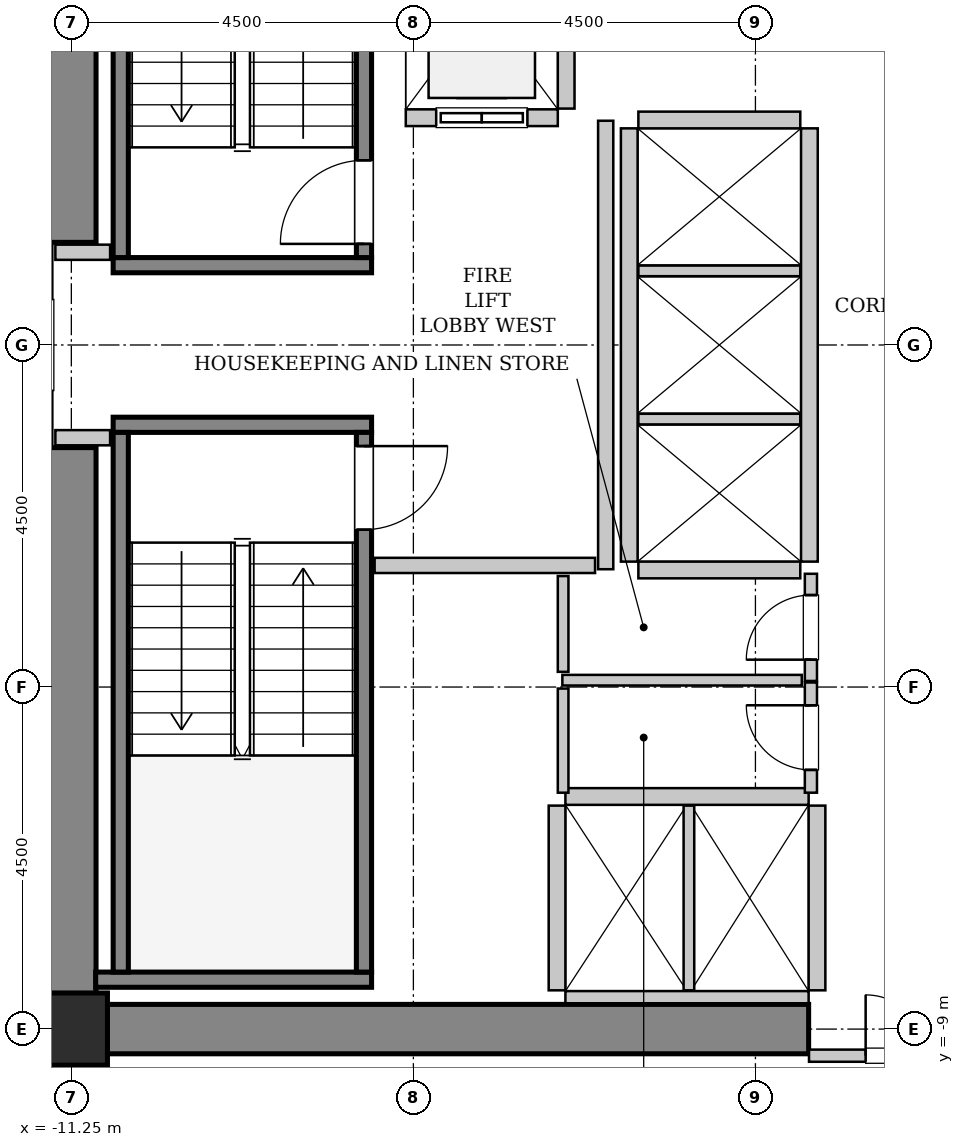
"""IFC4 building model, lengths in metres.
Left out: names, types, materials, properties, quantities, classifications, styles, units other than length and angle.
Written with IfcOpenShell. Run it as: python <this file> out.ifc"""

import sys

from ifc_helpers import new_model, si_unit, direction, frame, frame_2d, origin, origin_2d, place, context, subcontext, project, spatial, rectangle, hollow_rectangle, extrude, source, transform, mapped, element, fill, save


model = new_model("IFC4")
c1 = context("Model", 3, precision=1e-05, world=origin(), true_north=direction((0.0, 1.0)))
c2 = subcontext(c1, "Body", "Model", "MODEL_VIEW")
j1 = project(units=[si_unit("LENGTHUNIT", "METRE"), si_unit("PLANEANGLEUNIT", "RADIAN")], contexts=[c1])
p1 = place(None, origin())
s1 = spatial("IfcSite", under=j1, at=p1, CompositionType="ELEMENT")
p2 = place(p1, origin())
s2 = spatial("IfcBuilding", under=s1, at=p2, CompositionType="ELEMENT")
p3 = place(p2, frame((0.0, 0.0, 44.4)))
s3 = spatial("IfcBuildingStorey", under=s2, at=p3, CompositionType="ELEMENT", Elevation=44.4)
m1 = source(origin(), c2, "Body", "SweptSolid", [
    extrude(rectangle(XDim=10.025, YDim=0.65, at=frame_2d((5.012, 0.0))), origin(), (0.0, 0.0, 1.0), 3.8),
])
p4 = place(p3, frame((-11.575, -9.0, 0.0), z_axis=(0.0, 0.0, 1.0), x_axis=(1.0, 0.0, 0.0)))
e1 = element("IfcWall", 1, at=p4, inside=s3, PredefinedType="SHEAR", context=c2, shape_type="MappedRepresentation", body=[
    mapped(m1, transform((0.0, 0.0, 0.0), x_axis=(1.0, 0.0, 0.0), y_axis=(0.0, 1.0, 0.0), z_axis=(0.0, 0.0, 1.0), scale=1.0)),
])
m2 = source(origin(), c2, "Body", "SweptSolid", [
    extrude(rectangle(XDim=7.325, YDim=0.65, at=frame_2d((3.663, 0.0))), origin(), (0.0, 0.0, 1.0), 3.8),
])
for number, where, z_axis, x_axis in (
    (2, (-11.25, -8.675, 0.0), (0.0, 0.0, 1.0), (0.0, 1.0, 0.0)),
    (3, (-11.25, 1.35, 0.0), (0.0, 0.0, 1.0), (0.0, 1.0, 0.0)),
):
    element("IfcWall", number, at=place(p3, frame(where, z_axis=z_axis, x_axis=x_axis)), inside=s3, PredefinedType="SHEAR", context=c2, shape_type="MappedRepresentation", body=[
        mapped(m2, transform((0.0, 0.0, 0.0), x_axis=(1.0, 0.0, 0.0), y_axis=(0.0, 1.0, 0.0), z_axis=(0.0, 0.0, 1.0), scale=1.0)),
    ])
m3 = source(origin(), c2, "Body", "SweptSolid", [
    extrude(hollow_rectangle(XDim=0.95, YDim=0.95, WallThickness=0.045, InnerFilletRadius=0.045, OuterFilletRadius=0.09, at=origin_2d()), origin(), (0.0, 0.0, 1.0), 3.8),
])
p5 = place(p3, frame((-11.25, -9.0, 0.0), z_axis=(0.0, 0.0, 1.0), x_axis=(1.0, 0.0, 0.0)))
e4 = element("IfcColumn", 4, at=p5, inside=s3, PredefinedType="COLUMN", context=c2, shape_type="MappedRepresentation", body=[
    mapped(m3, transform((0.0, 0.0, 0.0), x_axis=(1.0, 0.0, 0.0), y_axis=(0.0, 1.0, 0.0), z_axis=(0.0, 0.0, 1.0), scale=1.0)),
])
m4 = source(origin(), c2, "Body", "SweptSolid", [
    extrude(rectangle(XDim=3.4, YDim=0.2, at=frame_2d((1.7, 0.0))), origin(), (0.0, 0.0, 1.0), 3.8),
])
p6 = place(p3, frame((-7.3, 1.05, 0.0), z_axis=(0.0, 0.0, 1.0), x_axis=(-1.0, 0.0, 0.0)))
e5 = element("IfcWall", 5, at=p6, inside=s3, PredefinedType="SOLIDWALL", context=c2, shape_type="MappedRepresentation", body=[
    mapped(m4, transform((0.0, 0.0, 0.0), x_axis=(1.0, 0.0, 0.0), y_axis=(0.0, 1.0, 0.0), z_axis=(0.0, 0.0, 1.0), scale=1.0)),
])
m5 = source(origin(), c2, "Body", "SweptSolid", [
    extrude(rectangle(XDim=7.1, YDim=0.2, at=frame_2d((3.55, 0.0))), origin(), (0.0, 0.0, 1.0), 3.8),
])
p7 = place(p3, frame((-7.4, 1.15, 0.0), z_axis=(0.0, 0.0, 1.0), x_axis=(0.0, 1.0, 0.0)))
e6 = element("IfcWall", 6, at=p7, inside=s3, PredefinedType="SOLIDWALL", context=c2, shape_type="MappedRepresentation", body=[
    mapped(m5, transform((0.0, 0.0, 0.0), x_axis=(1.0, 0.0, 0.0), y_axis=(0.0, 1.0, 0.0), z_axis=(0.0, 0.0, 1.0), scale=1.0)),
])
p8 = place(p7, frame((0.18, 0.0, 0.0)))
e7 = element("IfcOpeningElement", 7, at=p8, cuts=e6, PredefinedType="OPENING", context=c2, shape_type="SweptSolid", body=[
    extrude(rectangle(XDim=1.1, YDim=2.15, at=frame_2d((0.55, 1.075))), frame((0.0, 0.11, 0.0), z_axis=(0.0, -1.0, 0.0), x_axis=(1.0, 0.0, 0.0)), (0.0, 0.0, 1.0), 0.22),
])
p9 = place(p3, frame((-10.6, 1.15, 0.0), z_axis=(0.0, 0.0, 1.0), x_axis=(0.0, 1.0, 0.0)))
e8 = element("IfcWall", 8, at=p9, inside=s3, PredefinedType="SOLIDWALL", context=c2, shape_type="MappedRepresentation", body=[
    mapped(m5, transform((0.0, 0.0, 0.0), x_axis=(1.0, 0.0, 0.0), y_axis=(0.0, 1.0, 0.0), z_axis=(0.0, 0.0, 1.0), scale=1.0)),
])
p10 = place(p3, frame((-10.7, -1.05, 0.0), z_axis=(0.0, 0.0, 1.0), x_axis=(1.0, 0.0, 0.0)))
e9 = element("IfcWall", 9, at=p10, inside=s3, PredefinedType="SOLIDWALL", context=c2, shape_type="MappedRepresentation", body=[
    mapped(m4, transform((0.0, 0.0, 0.0), x_axis=(1.0, 0.0, 0.0), y_axis=(0.0, 1.0, 0.0), z_axis=(0.0, 0.0, 1.0), scale=1.0)),
])
m6 = source(origin(), c2, "Body", "SweptSolid", [
    extrude(rectangle(XDim=3.63, YDim=0.2, at=frame_2d((1.815, 0.0))), origin(), (0.0, 0.0, 1.0), 3.8),
])
p11 = place(p3, frame((-10.93, -8.35, 0.0), z_axis=(0.0, 0.0, 1.0), x_axis=(1.0, 0.0, 0.0)))
e10 = element("IfcWall", 10, at=p11, inside=s3, PredefinedType="SOLIDWALL", context=c2, shape_type="MappedRepresentation", body=[
    mapped(m6, transform((0.0, 0.0, 0.0), x_axis=(1.0, 0.0, 0.0), y_axis=(0.0, 1.0, 0.0), z_axis=(0.0, 0.0, 1.0), scale=1.0)),
])
p12 = place(p3, frame((-10.6, -1.15, 0.0), z_axis=(0.0, 0.0, 1.0), x_axis=(0.0, -1.0, 0.0)))
e11 = element("IfcWall", 11, at=p12, inside=s3, PredefinedType="SOLIDWALL", context=c2, shape_type="MappedRepresentation", body=[
    mapped(m5, transform((0.0, 0.0, 0.0), x_axis=(1.0, 0.0, 0.0), y_axis=(0.0, 1.0, 0.0), z_axis=(0.0, 0.0, 1.0), scale=1.0)),
])
p13 = place(p3, frame((-7.4, -1.15, 0.0), z_axis=(0.0, 0.0, 1.0), x_axis=(0.0, -1.0, 0.0)))
e12 = element("IfcWall", 12, at=p13, inside=s3, PredefinedType="SOLIDWALL", context=c2, shape_type="MappedRepresentation", body=[
    mapped(m5, transform((0.0, 0.0, 0.0), x_axis=(1.0, 0.0, 0.0), y_axis=(0.0, 1.0, 0.0), z_axis=(0.0, 0.0, 1.0), scale=1.0)),
])
p14 = place(p13, frame((0.18, 0.0, 0.0)))
e13 = element("IfcOpeningElement", 13, at=p14, cuts=e12, PredefinedType="OPENING", context=c2, shape_type="SweptSolid", body=[
    extrude(rectangle(XDim=1.1, YDim=2.15, at=frame_2d((0.55, 1.075))), frame((0.0, 0.11, 0.0), z_axis=(0.0, -1.0, 0.0), x_axis=(1.0, 0.0, 0.0)), (0.0, 0.0, 1.0), 0.22),
])
m7 = source(origin(), c2, "Body", "SweptSolid", [
    extrude(rectangle(XDim=2.0, YDim=0.22, at=frame_2d((1.0, 0.0))), origin(), (0.0, 0.0, 1.0), 3.535),
])
p15 = place(p3, frame((-6.85, 2.99, 0.0), z_axis=(0.0, 0.0, 1.0), x_axis=(1.0, 0.0, 0.0)))
e14 = element("IfcWall", 14, at=p15, inside=s3, PredefinedType="SOLIDWALL", context=c2, shape_type="MappedRepresentation", body=[
    mapped(m7, transform((0.0, 0.0, 0.0), x_axis=(1.0, 0.0, 0.0), y_axis=(0.0, 1.0, 0.0), z_axis=(0.0, 0.0, 1.0), scale=1.0)),
])
p16 = place(p15, frame((0.4, 0.0, 0.0)))
e15 = element("IfcOpeningElement", 15, at=p16, cuts=e14, PredefinedType="OPENING", context=c2, shape_type="SweptSolid", body=[
    extrude(rectangle(XDim=1.2, YDim=2.2, at=frame_2d((0.6, 1.1))), frame((0.0, 0.12, 0.0), z_axis=(0.0, -1.0, 0.0), x_axis=(1.0, 0.0, 0.0)), (0.0, 0.0, 1.0), 0.24),
])
m8 = source(origin(), c2, "Body", "SweptSolid", [
    extrude(rectangle(XDim=2.68, YDim=0.22, at=frame_2d((1.34, 0.0))), origin(), (0.0, 0.0, 1.0), 3.535),
])
p17 = place(p3, frame((-4.74, 3.11, 0.0), z_axis=(0.0, 0.0, 1.0), x_axis=(0.0, 1.0, 0.0)))
e16 = element("IfcWall", 16, at=p17, inside=s3, PredefinedType="SOLIDWALL", context=c2, shape_type="MappedRepresentation", body=[
    mapped(m8, transform((0.0, 0.0, 0.0), x_axis=(1.0, 0.0, 0.0), y_axis=(0.0, 1.0, 0.0), z_axis=(0.0, 0.0, 1.0), scale=1.0)),
])
m9 = source(origin(), c2, "Body", "SweptSolid", [
    extrude(rectangle(XDim=3.2, YDim=0.22, at=frame_2d((1.6, 0.0))), origin(), (0.0, 0.0, 1.0), 3.535),
])
p18 = place(p3, frame((-1.55, -5.94, 0.0), z_axis=(0.0, 0.0, 1.0), x_axis=(-1.0, 0.0, 0.0)))
e17 = element("IfcWall", 17, at=p18, inside=s3, PredefinedType="SOLIDWALL", context=c2, shape_type="MappedRepresentation", body=[
    mapped(m9, transform((0.0, 0.0, 0.0), x_axis=(1.0, 0.0, 0.0), y_axis=(0.0, 1.0, 0.0), z_axis=(0.0, 0.0, 1.0), scale=1.0)),
])
m10 = source(origin(), c2, "Body", "SweptSolid", [
    extrude(rectangle(XDim=3.2, YDim=0.16, at=frame_2d((1.6, 0.0))), origin(), (0.0, 0.0, 1.0), 2.425),
])
p19 = place(p3, frame((-4.75, -8.58, 0.0), z_axis=(0.0, 0.0, 1.0), x_axis=(1.0, 0.0, 0.0)))
e18 = element("IfcWall", 18, at=p19, inside=s3, PredefinedType="PARTITIONING", context=c2, shape_type="MappedRepresentation", body=[
    mapped(m10, transform((0.0, 0.0, 0.0), x_axis=(1.0, 0.0, 0.0), y_axis=(0.0, 1.0, 0.0), z_axis=(0.0, 0.0, 1.0), scale=1.0)),
])
m11 = source(origin(), c2, "Body", "SweptSolid", [
    extrude(rectangle(XDim=2.43, YDim=0.22, at=frame_2d((1.215, 0.0))), origin(), (0.0, 0.0, 1.0), 3.535),
])
p20 = place(p3, frame((-4.86, -6.06, 0.0), z_axis=(0.0, 0.0, 1.0), x_axis=(0.0, -1.0, 0.0)))
e19 = element("IfcWall", 19, at=p20, inside=s3, PredefinedType="SOLIDWALL", context=c2, shape_type="MappedRepresentation", body=[
    mapped(m11, transform((0.0, 0.0, 0.0), x_axis=(1.0, 0.0, 0.0), y_axis=(0.0, 1.0, 0.0), z_axis=(0.0, 0.0, 1.0), scale=1.0)),
])
m12 = source(origin(), c2, "Body", "SweptSolid", [
    extrude(rectangle(XDim=2.43, YDim=0.14, at=frame_2d((1.215, 0.0))), origin(), (0.0, 0.0, 1.0), 3.535),
])
p21 = place(p3, frame((-3.125, -8.49, 0.0), z_axis=(0.0, 0.0, 1.0), x_axis=(0.0, 1.0, 0.0)))
e20 = element("IfcWall", 20, at=p21, inside=s3, PredefinedType="PARTITIONING", context=c2, shape_type="MappedRepresentation", body=[
    mapped(m12, transform((0.0, 0.0, 0.0), x_axis=(1.0, 0.0, 0.0), y_axis=(0.0, 1.0, 0.0), z_axis=(0.0, 0.0, 1.0), scale=1.0)),
])
p22 = place(p3, frame((-1.44, -8.49, 0.0), z_axis=(0.0, 0.0, 1.0), x_axis=(0.0, 1.0, 0.0)))
e21 = element("IfcWall", 21, at=p22, inside=s3, PredefinedType="SOLIDWALL", context=c2, shape_type="MappedRepresentation", body=[
    mapped(m11, transform((0.0, 0.0, 0.0), x_axis=(1.0, 0.0, 0.0), y_axis=(0.0, 1.0, 0.0), z_axis=(0.0, 0.0, 1.0), scale=1.0)),
])
m13 = source(origin(), c2, "Body", "SweptSolid", [
    extrude(rectangle(XDim=5.7, YDim=0.22, at=frame_2d((2.85, 0.0))), origin(), (0.0, 0.0, 1.0), 3.535),
])
for number, where, z_axis, x_axis in (
    (22, (-1.54, -2.85, 0.0), (0.0, 0.0, 1.0), (0.0, 1.0, 0.0)),
    (23, (-3.91, 2.85, 0.0), (0.0, 0.0, 1.0), (0.0, -1.0, 0.0)),
):
    element("IfcWall", number, at=place(p3, frame(where, z_axis=z_axis, x_axis=x_axis)), inside=s3, PredefinedType="SOLIDWALL", context=c2, shape_type="MappedRepresentation", body=[
        mapped(m13, transform((0.0, 0.0, 0.0), x_axis=(1.0, 0.0, 0.0), y_axis=(0.0, 1.0, 0.0), z_axis=(0.0, 0.0, 1.0), scale=1.0)),
    ])
m14 = source(origin(), c2, "Body", "SweptSolid", [
    extrude(rectangle(XDim=2.13, YDim=0.22, at=frame_2d((1.065, 0.0))), origin(), (0.0, 0.0, 1.0), 3.535),
])
p23 = place(p3, frame((-3.79, -2.96, 0.0), z_axis=(0.0, 0.0, 1.0), x_axis=(1.0, 0.0, 0.0)))
e24 = element("IfcWall", 24, at=p23, inside=s3, PredefinedType="SOLIDWALL", context=c2, shape_type="MappedRepresentation", body=[
    mapped(m14, transform((0.0, 0.0, 0.0), x_axis=(1.0, 0.0, 0.0), y_axis=(0.0, 1.0, 0.0), z_axis=(0.0, 0.0, 1.0), scale=1.0)),
])
m15 = source(origin(), c2, "Body", "SweptSolid", [
    extrude(rectangle(XDim=2.13, YDim=0.14, at=frame_2d((1.065, 0.0))), origin(), (0.0, 0.0, 1.0), 3.535),
])
for number, where, z_axis, x_axis in (
    (25, (-3.79, -0.975, 0.0), (0.0, 0.0, 1.0), (1.0, 0.0, 0.0)),
    (26, (-3.79, 0.975, 0.0), (0.0, 0.0, 1.0), (1.0, 0.0, 0.0)),
):
    element("IfcWall", number, at=place(p3, frame(where, z_axis=z_axis, x_axis=x_axis)), inside=s3, PredefinedType="PARTITIONING", context=c2, shape_type="MappedRepresentation", body=[
        mapped(m15, transform((0.0, 0.0, 0.0), x_axis=(1.0, 0.0, 0.0), y_axis=(0.0, 1.0, 0.0), z_axis=(0.0, 0.0, 1.0), scale=1.0)),
    ])
p24 = place(p3, frame((-1.66, 2.96, 0.0), z_axis=(0.0, 0.0, 1.0), x_axis=(-1.0, 0.0, 0.0)))
e27 = element("IfcWall", 27, at=p24, inside=s3, PredefinedType="SOLIDWALL", context=c2, shape_type="MappedRepresentation", body=[
    mapped(m14, transform((0.0, 0.0, 0.0), x_axis=(1.0, 0.0, 0.0), y_axis=(0.0, 1.0, 0.0), z_axis=(0.0, 0.0, 1.0), scale=1.0)),
])
m16 = source(origin(), c2, "Body", "SweptSolid", [
    extrude(rectangle(XDim=5.9, YDim=0.2, at=frame_2d((2.95, 0.0))), origin(), (0.0, 0.0, 1.0), 3.535),
])
p25 = place(p3, frame((-4.22, -2.95, 0.0), z_axis=(0.0, 0.0, 1.0), x_axis=(0.0, 1.0, 0.0)))
e28 = element("IfcWall", 28, at=p25, inside=s3, PredefinedType="PARTITIONING", context=c2, shape_type="MappedRepresentation", body=[
    mapped(m16, transform((0.0, 0.0, 0.0), x_axis=(1.0, 0.0, 0.0), y_axis=(0.0, 1.0, 0.0), z_axis=(0.0, 0.0, 1.0), scale=1.0)),
])
m17 = source(origin(), c2, "Body", "SweptSolid", [
    extrude(rectangle(XDim=2.9, YDim=0.2, at=frame_2d((1.45, 0.0))), origin(), (0.0, 0.0, 1.0), 3.535),
])
p26 = place(p3, frame((-7.26, -2.9, 0.0), z_axis=(0.0, 0.0, 1.0), x_axis=(1.0, 0.0, 0.0)))
e29 = element("IfcWall", 29, at=p26, inside=s3, PredefinedType="PARTITIONING", context=c2, shape_type="MappedRepresentation", body=[
    mapped(m17, transform((0.0, 0.0, 0.0), x_axis=(1.0, 0.0, 0.0), y_axis=(0.0, 1.0, 0.0), z_axis=(0.0, 0.0, 1.0), scale=1.0)),
])
m18 = source(origin(), c2, "Body", "SweptSolid", [
    extrude(rectangle(XDim=0.72, YDim=0.2, at=frame_2d((0.36, 0.0))), origin(), (0.0, 0.0, 1.0), 3.535),
])
for number, where, z_axis, x_axis in (
    (30, (-11.46, 1.22, 0.0), (0.0, 0.0, 1.0), (1.0, 0.0, 0.0)),
    (31, (-11.46, -1.22, 0.0), (0.0, 0.0, 1.0), (1.0, 0.0, 0.0)),
):
    element("IfcWall", number, at=place(p3, frame(where, z_axis=z_axis, x_axis=x_axis)), inside=s3, PredefinedType="PARTITIONING", context=c2, shape_type="MappedRepresentation", body=[
        mapped(m18, transform((0.0, 0.0, 0.0), x_axis=(1.0, 0.0, 0.0), y_axis=(0.0, 1.0, 0.0), z_axis=(0.0, 0.0, 1.0), scale=1.0)),
    ])
m19 = source(origin(), c2, "Body", "SweptSolid", [
    extrude(rectangle(XDim=3.09, YDim=0.16, at=frame_2d((1.545, 0.0))), origin(), (0.0, 0.0, 1.0), 2.425),
])
p27 = place(p3, frame((-1.545, -9.35, 0.0), z_axis=(0.0, 0.0, 1.0), x_axis=(1.0, 0.0, 0.0)))
e32 = element("IfcWall", 32, at=p27, inside=s3, PredefinedType="PARTITIONING", context=c2, shape_type="MappedRepresentation", body=[
    mapped(m19, transform((0.0, 0.0, 0.0), x_axis=(1.0, 0.0, 0.0), y_axis=(0.0, 1.0, 0.0), z_axis=(0.0, 0.0, 1.0), scale=1.0)),
])
p28 = place(p27, frame((0.745, 0.0, 0.0)))
e33 = element("IfcOpeningElement", 33, at=p28, cuts=e32, PredefinedType="OPENING", context=c2, shape_type="SweptSolid", body=[
    extrude(rectangle(XDim=1.6, YDim=2.3, at=frame_2d((0.8, 1.15))), frame((0.0, 0.09, 0.0), z_axis=(0.0, -1.0, 0.0), x_axis=(1.0, 0.0, 0.0)), (0.0, 0.0, 1.0), 0.18),
])
m20 = source(origin(), c2, "Body", "SweptSolid", [
    extrude(rectangle(XDim=1.41, YDim=0.16, at=frame_2d((0.705, 0.0))), origin(), (0.0, 0.0, 1.0), 3.535),
])
p29 = place(p3, frame((-1.52, -4.42, 0.0), z_axis=(0.0, 0.0, 1.0), x_axis=(0.0, 1.0, 0.0)))
e34 = element("IfcWall", 34, at=p29, inside=s3, PredefinedType="PARTITIONING", context=c2, shape_type="MappedRepresentation", body=[
    mapped(m20, transform((0.0, 0.0, 0.0), x_axis=(1.0, 0.0, 0.0), y_axis=(0.0, 1.0, 0.0), z_axis=(0.0, 0.0, 1.0), scale=1.0)),
])
p30 = place(p29, frame((0.28, 0.0, 0.0)))
e35 = element("IfcOpeningElement", 35, at=p30, cuts=e34, PredefinedType="OPENING", context=c2, shape_type="SweptSolid", body=[
    extrude(rectangle(XDim=0.85, YDim=2.1, at=frame_2d((0.425, 1.05))), frame((0.0, 0.09, 0.0), z_axis=(0.0, -1.0, 0.0), x_axis=(1.0, 0.0, 0.0)), (0.0, 0.0, 1.0), 0.18),
])
m21 = source(origin(), c2, "Body", "SweptSolid", [
    extrude(rectangle(XDim=3.15, YDim=0.14, at=frame_2d((1.575, 0.0))), origin(), (0.0, 0.0, 1.0), 3.535),
])
p31 = place(p3, frame((-4.79, -4.41, 0.0), z_axis=(0.0, 0.0, 1.0), x_axis=(1.0, 0.0, 0.0)))
e36 = element("IfcWall", 36, at=p31, inside=s3, PredefinedType="PARTITIONING", context=c2, shape_type="MappedRepresentation", body=[
    mapped(m21, transform((0.0, 0.0, 0.0), x_axis=(1.0, 0.0, 0.0), y_axis=(0.0, 1.0, 0.0), z_axis=(0.0, 0.0, 1.0), scale=1.0)),
])
m22 = source(origin(), c2, "Body", "SweptSolid", [
    extrude(rectangle(XDim=1.26, YDim=0.14, at=frame_2d((0.63, 0.0))), origin(), (0.0, 0.0, 1.0), 3.535),
])
p32 = place(p3, frame((-4.78, -4.3, 0.0), z_axis=(0.0, 0.0, 1.0), x_axis=(0.0, 1.0, 0.0)))
e37 = element("IfcWall", 37, at=p32, inside=s3, PredefinedType="PARTITIONING", context=c2, shape_type="MappedRepresentation", body=[
    mapped(m22, transform((0.0, 0.0, 0.0), x_axis=(1.0, 0.0, 0.0), y_axis=(0.0, 1.0, 0.0), z_axis=(0.0, 0.0, 1.0), scale=1.0)),
])
m23 = source(origin(), c2, "Body", "SweptSolid", [
    extrude(rectangle(XDim=1.45, YDim=0.16, at=frame_2d((0.725, 0.0))), origin(), (0.0, 0.0, 1.0), 3.535),
])
p33 = place(p3, frame((-1.52, -5.89, 0.0), z_axis=(0.0, 0.0, 1.0), x_axis=(0.0, 1.0, 0.0)))
e38 = element("IfcWall", 38, at=p33, inside=s3, PredefinedType="PARTITIONING", context=c2, shape_type="MappedRepresentation", body=[
    mapped(m23, transform((0.0, 0.0, 0.0), x_axis=(1.0, 0.0, 0.0), y_axis=(0.0, 1.0, 0.0), z_axis=(0.0, 0.0, 1.0), scale=1.0)),
])
p34 = place(p33, frame((0.3, 0.0, 0.0)))
e39 = element("IfcOpeningElement", 39, at=p34, cuts=e38, PredefinedType="OPENING", context=c2, shape_type="SweptSolid", body=[
    extrude(rectangle(XDim=0.85, YDim=2.1, at=frame_2d((0.425, 1.05))), frame((0.0, 0.09, 0.0), z_axis=(0.0, -1.0, 0.0), x_axis=(1.0, 0.0, 0.0)), (0.0, 0.0, 1.0), 0.18),
])
m24 = source(origin(), c2, "Body", "SweptSolid", [
    extrude(rectangle(XDim=1.37, YDim=0.14, at=frame_2d((0.685, 0.0))), origin(), (0.0, 0.0, 1.0), 3.535),
])
p35 = place(p3, frame((-4.78, -5.89, 0.0), z_axis=(0.0, 0.0, 1.0), x_axis=(0.0, 1.0, 0.0)))
e40 = element("IfcWall", 40, at=p35, inside=s3, PredefinedType="PARTITIONING", context=c2, shape_type="MappedRepresentation", body=[
    mapped(m24, transform((0.0, 0.0, 0.0), x_axis=(1.0, 0.0, 0.0), y_axis=(0.0, 1.0, 0.0), z_axis=(0.0, 0.0, 1.0), scale=1.0)),
])
m25 = source(origin(), c2, "Body", "SweptSolid", [
    extrude(rectangle(XDim=1.1, YDim=2.15, at=frame_2d((0.55, 1.075))), frame((0.0, 0.025, 0.0), z_axis=(0.0, -1.0, 0.0), x_axis=(1.0, 0.0, 0.0)), (0.0, 0.0, 1.0), 0.05),
])
p36 = place(p8, origin())
e41 = element("IfcDoor", 41, at=p36, inside=s3, OperationType="SINGLE_SWING_LEFT", PredefinedType="DOOR", context=c2, shape_type="MappedRepresentation", body=[
    mapped(m25, transform((0.0, 0.0, 0.0), x_axis=(1.0, 0.0, 0.0), y_axis=(0.0, 1.0, 0.0), z_axis=(0.0, 0.0, 1.0), scale=1.0)),
])
fill(e7, e41)
p37 = place(p14, origin())
e42 = element("IfcDoor", 42, at=p37, inside=s3, OperationType="SINGLE_SWING_LEFT", PredefinedType="DOOR", context=c2, shape_type="MappedRepresentation", body=[
    mapped(m25, transform((0.0, 0.0, 0.0), x_axis=(1.0, 0.0, 0.0), y_axis=(0.0, 1.0, 0.0), z_axis=(0.0, 0.0, 1.0), scale=1.0)),
])
fill(e13, e42)
m26 = source(origin(), c2, "Body", "SweptSolid", [
    extrude(rectangle(XDim=1.2, YDim=2.2, at=frame_2d((0.6, 1.1))), frame((0.0, 0.025, 0.0), z_axis=(0.0, -1.0, 0.0), x_axis=(1.0, 0.0, 0.0)), (0.0, 0.0, 1.0), 0.05),
])
p38 = place(p16, origin())
e43 = element("IfcDoor", 43, at=p38, inside=s3, OperationType="SLIDING_TO_LEFT", PredefinedType="DOOR", context=c2, shape_type="MappedRepresentation", body=[
    mapped(m26, transform((0.0, 0.0, 0.0), x_axis=(1.0, 0.0, 0.0), y_axis=(0.0, 1.0, 0.0), z_axis=(0.0, 0.0, 1.0), scale=1.0)),
])
fill(e15, e43)
m27 = source(origin(), c2, "Body", "SweptSolid", [
    extrude(rectangle(XDim=1.6, YDim=2.3, at=frame_2d((0.8, 1.15))), frame((0.0, 0.025, 0.0), z_axis=(0.0, -1.0, 0.0), x_axis=(1.0, 0.0, 0.0)), (0.0, 0.0, 1.0), 0.05),
])
p39 = place(p28, origin())
e44 = element("IfcDoor", 44, at=p39, inside=s3, OperationType="DOUBLE_DOOR_SINGLE_SWING", PredefinedType="DOOR", context=c2, shape_type="MappedRepresentation", body=[
    mapped(m27, transform((0.0, 0.0, 0.0), x_axis=(1.0, 0.0, 0.0), y_axis=(0.0, 1.0, 0.0), z_axis=(0.0, 0.0, 1.0), scale=1.0)),
])
fill(e33, e44)
m28 = source(origin(), c2, "Body", "SweptSolid", [
    extrude(rectangle(XDim=0.85, YDim=2.1, at=frame_2d((0.425, 1.05))), frame((0.0, 0.025, 0.0), z_axis=(0.0, -1.0, 0.0), x_axis=(1.0, 0.0, 0.0)), (0.0, 0.0, 1.0), 0.05),
])
p40 = place(p30, origin())
e45 = element("IfcDoor", 45, at=p40, inside=s3, OperationType="SINGLE_SWING_LEFT", PredefinedType="DOOR", context=c2, shape_type="MappedRepresentation", body=[
    mapped(m28, transform((0.0, 0.0, 0.0), x_axis=(1.0, 0.0, 0.0), y_axis=(0.0, 1.0, 0.0), z_axis=(0.0, 0.0, 1.0), scale=1.0)),
])
fill(e35, e45)
p41 = place(p34, origin())
e46 = element("IfcDoor", 46, at=p41, inside=s3, OperationType="SINGLE_SWING_RIGHT", PredefinedType="DOOR", context=c2, shape_type="MappedRepresentation", body=[
    mapped(m28, transform((0.0, 0.0, 0.0), x_axis=(1.0, 0.0, 0.0), y_axis=(0.0, 1.0, 0.0), z_axis=(0.0, 0.0, 1.0), scale=1.0)),
])
fill(e39, e46)
save(model, sys.argv[1])
